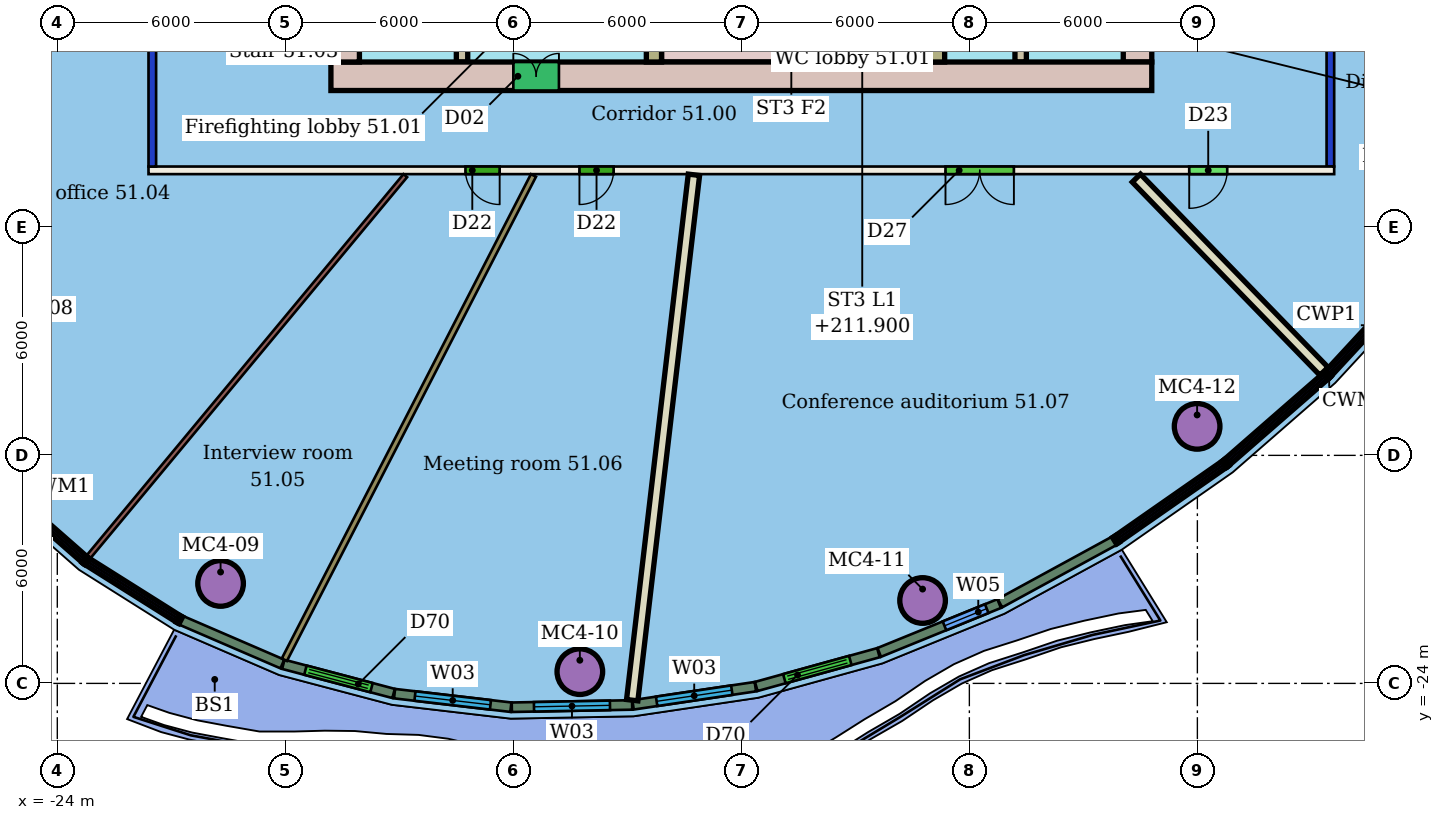
"""IFC4 building model, lengths in metres.
Left out: names, types, materials, properties, quantities, classifications, styles, units other than length and angle.
Written with IfcOpenShell. Run it as: python <this file> out.ifc"""

import sys

from ifc_helpers import new_model, si_unit, direction, frame, frame_2d, origin, origin_2d, place, context, subcontext, project, spatial, rectangle, hollow_circle, extrude, element, fill, save


model = new_model("IFC4")
c1 = context("Model", 3, precision=1e-05, world=origin(), true_north=direction((0.0, 1.0)))
c2 = subcontext(c1, "Body", "Model", "MODEL_VIEW")
j1 = project(units=[si_unit("LENGTHUNIT", "METRE"), si_unit("PLANEANGLEUNIT", "RADIAN")], contexts=[c1])
p1 = place(None, origin())
s1 = spatial("IfcSite", under=j1, at=p1, CompositionType="ELEMENT")
p2 = place(p1, origin())
s2 = spatial("IfcBuilding", under=s1, at=p2, CompositionType="ELEMENT")
p3 = place(p2, frame((0.0, 0.0, 210.1)))
s3 = spatial("IfcBuildingStorey", under=s2, at=p3, CompositionType="ELEMENT", Elevation=210.1)
for number, where, z_axis, x_axis in (
    (1, (-19.704, -21.37, 0.0), (0.0, 0.0, 1.0), (1.0, 0.0, 0.0)),
    (2, (-10.25, -23.691, 0.0), (0.0, 0.0, 1.0), (1.0, 0.0, 0.0)),
    (3, (-1.231, -21.819, 0.0), (0.0, 0.0, 1.0), (1.0, 0.0, 0.0)),
    (4, (5.993, -17.237, 0.0), (0.0, 0.0, 1.0), (1.0, 0.0, 0.0)),
):
    element("IfcColumn", number, at=place(p3, frame(where, z_axis=z_axis, x_axis=x_axis)), inside=s3, PredefinedType="COLUMN", context=c2, shape_type="SweptSolid", body=[
        extrude(hollow_circle(Radius=0.6, WallThickness=0.045, at=origin_2d()), origin(), (0.0, 0.0, 1.0), 3.45),
    ])
p4 = place(p3, frame((9.6, -10.5, 0.0), z_axis=(0.0, 0.0, 1.0), x_axis=(-1.0, 0.0, 0.0)))
e5 = element("IfcWall", 5, at=p4, inside=s3, PredefinedType="PARTITIONING", context=c2, shape_type="SweptSolid", body=[
    extrude(rectangle(XDim=31.2, YDim=0.2, at=frame_2d((15.6, 0.0))), origin(), (0.0, 0.0, 1.0), 3.45),
])
p5 = place(p4, frame((21.96, 0.0, 0.0)))
e6 = element("IfcOpeningElement", 6, at=p5, cuts=e5, PredefinedType="OPENING", context=c2, shape_type="SweptSolid", body=[
    extrude(rectangle(XDim=0.9, YDim=2.1, at=frame_2d((0.45, 1.05))), frame((0.0, 0.11, 0.0), z_axis=(0.0, -1.0, 0.0), x_axis=(1.0, 0.0, 0.0)), (0.0, 0.0, 1.0), 0.22),
])
p6 = place(p4, frame((18.96, 0.0, 0.0)))
e7 = element("IfcOpeningElement", 7, at=p6, cuts=e5, PredefinedType="OPENING", context=c2, shape_type="SweptSolid", body=[
    extrude(rectangle(XDim=0.9, YDim=2.1, at=frame_2d((0.45, 1.05))), frame((0.0, 0.11, 0.0), z_axis=(0.0, -1.0, 0.0), x_axis=(1.0, 0.0, 0.0)), (0.0, 0.0, 1.0), 0.22),
])
p7 = place(p4, frame((8.428, 0.0, 0.0)))
e8 = element("IfcOpeningElement", 8, at=p7, cuts=e5, PredefinedType="OPENING", context=c2, shape_type="SweptSolid", body=[
    extrude(rectangle(XDim=1.8, YDim=2.4, at=frame_2d((0.9, 1.2))), frame((0.0, 0.11, 0.0), z_axis=(0.0, -1.0, 0.0), x_axis=(1.0, 0.0, 0.0)), (0.0, 0.0, 1.0), 0.22),
])
p8 = place(p4, frame((2.814, 0.0, 0.0)))
e9 = element("IfcOpeningElement", 9, at=p8, cuts=e5, PredefinedType="OPENING", context=c2, shape_type="SweptSolid", body=[
    extrude(rectangle(XDim=1.0, YDim=2.4, at=frame_2d((0.5, 1.2))), frame((0.0, 0.11, 0.0), z_axis=(0.0, -1.0, 0.0), x_axis=(1.0, 0.0, 0.0)), (0.0, 0.0, 1.0), 0.22),
])
p9 = place(p3, frame((-21.5, -10.4, 0.0), z_axis=(0.0, 0.0, 1.0), x_axis=(0.0, 1.0, 0.0)))
e10 = element("IfcWall", 10, at=p9, inside=s3, PredefinedType="PARTITIONING", context=c2, shape_type="SweptSolid", body=[
    extrude(rectangle(XDim=20.8, YDim=0.2, at=frame_2d((10.4, 0.0))), origin(), (0.0, 0.0, 1.0), 3.05),
])
p10 = place(p9, frame((6.277, 0.0, 0.0)))
e11 = element("IfcOpeningElement", 11, at=p10, cuts=e10, PredefinedType="OPENING", context=c2, shape_type="SweptSolid", body=[
    extrude(rectangle(XDim=1.8, YDim=2.1, at=frame_2d((0.9, 1.05))), frame((0.0, 0.11, 0.0), z_axis=(0.0, -1.0, 0.0), x_axis=(1.0, 0.0, 0.0)), (0.0, 0.0, 1.0), 0.22),
])
p11 = place(p3, frame((9.5, 10.4, 0.0), z_axis=(0.0, 0.0, 1.0), x_axis=(0.0, -1.0, 0.0)))
e12 = element("IfcWall", 12, at=p11, inside=s3, PredefinedType="PARTITIONING", context=c2, shape_type="SweptSolid", body=[
    extrude(rectangle(XDim=20.8, YDim=0.2, at=frame_2d((10.4, 0.0))), origin(), (0.0, 0.0, 1.0), 3.05),
])
p12 = place(p11, frame((11.307, 0.0, 0.0)))
e13 = element("IfcOpeningElement", 13, at=p12, cuts=e12, PredefinedType="OPENING", context=c2, shape_type="SweptSolid", body=[
    extrude(rectangle(XDim=1.5, YDim=2.1, at=frame_2d((0.75, 1.05))), frame((0.0, 0.11, 0.0), z_axis=(0.0, -1.0, 0.0), x_axis=(1.0, 0.0, 0.0)), (0.0, 0.0, 1.0), 0.22),
])
p13 = place(p3, frame((-23.177, -20.668, 0.0), z_axis=(0.0, 0.0, 1.0), x_axis=(0.639167269964, 0.769067747995, 0.0)))
e14 = element("IfcWall", 14, at=p13, inside=s3, PredefinedType="PARTITIONING", context=c2, shape_type="SweptSolid", body=[
    extrude(rectangle(XDim=13.04, YDim=0.125, at=frame_2d((6.52, 0.0))), origin(), (0.0, 0.0, 1.0), 3.45),
])
p14 = place(p3, frame((-18.025, -23.377, 0.0), z_axis=(0.0, 0.0, 1.0), x_axis=(0.457440787156, 0.88924008358, 0.0)))
e15 = element("IfcWall", 15, at=p14, inside=s3, PredefinedType="PARTITIONING", context=c2, shape_type="SweptSolid", body=[
    extrude(rectangle(XDim=14.33, YDim=0.15, at=frame_2d((7.165, 0.0))), origin(), (0.0, 0.0, 1.0), 3.45),
])
p15 = place(p3, frame((-8.872, -24.442, 0.0), z_axis=(0.0, 0.0, 1.0), x_axis=(0.116708950742, 0.993166159722, 0.0)))
e16 = element("IfcWall", 16, at=p15, inside=s3, PredefinedType="PARTITIONING", context=c2, shape_type="SweptSolid", body=[
    extrude(rectangle(XDim=13.919, YDim=0.3, at=frame_2d((6.96, 0.0))), origin(), (0.0, 0.0, 1.0), 3.45),
])
p16 = place(p3, frame((9.332, -15.788, 0.0), z_axis=(0.0, 0.0, 1.0), x_axis=(-0.696678313938, 0.717383667843, 0.0)))
e17 = element("IfcWall", 17, at=p16, inside=s3, PredefinedType="PARTITIONING", context=c2, shape_type="SweptSolid", body=[
    extrude(rectangle(XDim=7.086, YDim=0.3, at=frame_2d((3.543, 0.0))), origin(), (0.0, 0.0, 1.0), 3.45),
])
p17 = place(p3, frame((15.576, -7.376, 0.0), z_axis=(0.0, 0.0, 1.0), x_axis=(-0.946227116855, 0.323503080863, 0.0)))
e18 = element("IfcWall", 18, at=p17, inside=s3, PredefinedType="PARTITIONING", context=c2, shape_type="SweptSolid", body=[
    extrude(rectangle(XDim=6.294, YDim=0.125, at=frame_2d((3.147, 0.0))), origin(), (0.0, 0.0, 1.0), 3.45),
])
p18 = place(p3, frame((-20.735, -22.343, 0.0), z_axis=(0.0, 0.0, 1.0), x_axis=(0.918186540839, -0.396148300794, 0.0)))
e19 = element("IfcWall", 19, at=p18, inside=s3, PredefinedType="SOLIDWALL", context=c2, shape_type="SweptSolid", body=[
    extrude(rectangle(XDim=2.894, YDim=0.25, at=frame_2d((1.447, 0.0))), origin(), (0.0, 0.0, 1.0), 3.1),
])
p19 = place(p3, frame((-18.053, -23.498, 0.0), z_axis=(0.0, 0.0, 1.0), x_axis=(0.966837064295, -0.255393991914, 0.0)))
e20 = element("IfcWall", 20, at=p19, inside=s3, PredefinedType="SOLIDWALL", context=c2, shape_type="SweptSolid", body=[
    extrude(rectangle(XDim=3.002, YDim=0.25, at=frame_2d((1.501, 0.0))), origin(), (0.0, 0.0, 1.0), 3.1),
])
p20 = place(p19, frame((0.601, 0.0, 0.0)))
e21 = element("IfcOpeningElement", 21, at=p20, cuts=e20, PredefinedType="OPENING", context=c2, shape_type="SweptSolid", body=[
    extrude(rectangle(XDim=1.8, YDim=2.4, at=frame_2d((0.9, 1.2))), frame((0.0, 0.135, 0.0), z_axis=(0.0, -1.0, 0.0), x_axis=(1.0, 0.0, 0.0)), (0.0, 0.0, 1.0), 0.27),
])
p21 = place(p3, frame((-15.125, -24.27, 0.0), z_axis=(0.0, 0.0, 1.0), x_axis=(0.993285162652, -0.115691770042, 0.0)))
e22 = element("IfcWall", 22, at=p21, inside=s3, PredefinedType="SOLIDWALL", context=c2, shape_type="SweptSolid", body=[
    extrude(rectangle(XDim=3.081, YDim=0.25, at=frame_2d((1.541, 0.0))), origin(), (0.0, 0.0, 1.0), 3.1),
])
p22 = place(p21, frame((0.541, 0.0, 0.9)))
e23 = element("IfcOpeningElement", 23, at=p22, cuts=e22, PredefinedType="OPENING", context=c2, shape_type="SweptSolid", body=[
    extrude(rectangle(XDim=2.0, YDim=2.1, at=frame_2d((1.0, 1.05))), frame((0.0, 0.135, 0.0), z_axis=(0.0, -1.0, 0.0), x_axis=(1.0, 0.0, 0.0)), (0.0, 0.0, 1.0), 0.27),
])
p23 = place(p3, frame((-12.04, -24.627, 0.0), z_axis=(0.0, 0.0, 1.0), x_axis=(0.999814312732, 0.019270185659, 0.0)))
e24 = element("IfcWall", 24, at=p23, inside=s3, PredefinedType="SOLIDWALL", context=c2, shape_type="SweptSolid", body=[
    extrude(rectangle(XDim=3.167, YDim=0.25, at=frame_2d((1.583, 0.0))), origin(), (0.0, 0.0, 1.0), 3.1),
])
p24 = place(p23, frame((0.584, 0.0, 0.9)))
e25 = element("IfcOpeningElement", 25, at=p24, cuts=e24, PredefinedType="OPENING", context=c2, shape_type="SweptSolid", body=[
    extrude(rectangle(XDim=2.0, YDim=2.1, at=frame_2d((1.0, 1.05))), frame((0.0, 0.135, 0.0), z_axis=(0.0, -1.0, 0.0), x_axis=(1.0, 0.0, 0.0)), (0.0, 0.0, 1.0), 0.27),
])
p25 = place(p3, frame((-8.85, -24.564, 0.0), z_axis=(0.0, 0.0, 1.0), x_axis=(0.989129217208, 0.147048943092, 0.0)))
e26 = element("IfcWall", 26, at=p25, inside=s3, PredefinedType="SOLIDWALL", context=c2, shape_type="SweptSolid", body=[
    extrude(rectangle(XDim=3.254, YDim=0.25, at=frame_2d((1.627, 0.0))), origin(), (0.0, 0.0, 1.0), 3.1),
])
p26 = place(p25, frame((0.627, 0.0, 0.9)))
e27 = element("IfcOpeningElement", 27, at=p26, cuts=e26, PredefinedType="OPENING", context=c2, shape_type="SweptSolid", body=[
    extrude(rectangle(XDim=2.0, YDim=2.1, at=frame_2d((1.0, 1.05))), frame((0.0, 0.135, 0.0), z_axis=(0.0, -1.0, 0.0), x_axis=(1.0, 0.0, 0.0)), (0.0, 0.0, 1.0), 0.27),
])
p27 = place(p3, frame((-5.608, -24.081, 0.0), z_axis=(0.0, 0.0, 1.0), x_axis=(0.963820322112, 0.266552784048, 0.0)))
e28 = element("IfcWall", 28, at=p27, inside=s3, PredefinedType="SOLIDWALL", context=c2, shape_type="SweptSolid", body=[
    extrude(rectangle(XDim=3.336, YDim=0.25, at=frame_2d((1.668, 0.0))), origin(), (0.0, 0.0, 1.0), 3.1),
])
p28 = place(p27, frame((0.768, 0.0, 0.0)))
e29 = element("IfcOpeningElement", 29, at=p28, cuts=e28, PredefinedType="OPENING", context=c2, shape_type="SweptSolid", body=[
    extrude(rectangle(XDim=1.8, YDim=2.4, at=frame_2d((0.9, 1.2))), frame((0.0, 0.135, 0.0), z_axis=(0.0, -1.0, 0.0), x_axis=(1.0, 0.0, 0.0)), (0.0, 0.0, 1.0), 0.27),
])
p29 = place(p3, frame((-2.372, -23.185, 0.0), z_axis=(0.0, 0.0, 1.0), x_axis=(0.926160966141, 0.377128446019, 0.0)))
e30 = element("IfcWall", 30, at=p29, inside=s3, PredefinedType="SOLIDWALL", context=c2, shape_type="SweptSolid", body=[
    extrude(rectangle(XDim=3.407, YDim=0.25, at=frame_2d((1.704, 0.0))), origin(), (0.0, 0.0, 1.0), 3.1),
])
p30 = place(p29, frame((1.854, 0.0, 0.9)))
e31 = element("IfcOpeningElement", 31, at=p30, cuts=e30, PredefinedType="OPENING", context=c2, shape_type="SweptSolid", body=[
    extrude(rectangle(XDim=1.2, YDim=2.1, at=frame_2d((0.6, 1.05))), frame((0.0, 0.135, 0.0), z_axis=(0.0, -1.0, 0.0), x_axis=(1.0, 0.0, 0.0)), (0.0, 0.0, 1.0), 0.27),
])
p31 = place(p3, frame((0.804, -21.89, 0.0), z_axis=(0.0, 0.0, 1.0), x_axis=(0.877865563138, 0.478907144503, 0.0)))
e32 = element("IfcWall", 32, at=p31, inside=s3, PredefinedType="SOLIDWALL", context=c2, shape_type="SweptSolid", body=[
    extrude(rectangle(XDim=3.42, YDim=0.25, at=frame_2d((1.71, 0.0))), origin(), (0.0, 0.0, 1.0), 3.1),
])
p32 = place(p3, frame((-16.8, -8.025, 0.0), z_axis=(0.0, 0.0, 1.0), x_axis=(1.0, 0.0, 0.0)))
e33 = element("IfcWall", 33, at=p32, inside=s3, PredefinedType="SHEAR", context=c2, shape_type="SweptSolid", body=[
    extrude(rectangle(XDim=21.6, YDim=0.75, at=frame_2d((10.8, 0.0))), origin(), (0.0, 0.0, 1.0), 3.3),
])
p33 = place(p32, frame((4.8, 0.0, 0.0)))
e34 = element("IfcOpeningElement", 34, at=p33, cuts=e33, PredefinedType="OPENING", context=c2, shape_type="SweptSolid", body=[
    extrude(rectangle(XDim=1.2, YDim=2.1, at=frame_2d((0.6, 1.05))), frame((0.0, 0.385, 0.0), z_axis=(0.0, -1.0, 0.0), x_axis=(1.0, 0.0, 0.0)), (0.0, 0.0, 1.0), 0.77),
])
p34 = place(p3, frame((-16.425, 7.65, 0.0), z_axis=(0.0, 0.0, 1.0), x_axis=(0.0, -1.0, 0.0)))
e35 = element("IfcWall", 35, at=p34, inside=s3, PredefinedType="SHEAR", context=c2, shape_type="SweptSolid", body=[
    extrude(rectangle(XDim=15.3, YDim=0.75, at=frame_2d((7.65, 0.0))), origin(), (0.0, 0.0, 1.0), 3.3),
])
p35 = place(p34, frame((11.25, 0.0, 0.0)))
e36 = element("IfcOpeningElement", 36, at=p35, cuts=e35, PredefinedType="OPENING", context=c2, shape_type="SweptSolid", body=[
    extrude(rectangle(XDim=1.2, YDim=2.1, at=frame_2d((0.6, 1.05))), frame((0.0, 0.385, 0.0), z_axis=(0.0, -1.0, 0.0), x_axis=(1.0, 0.0, 0.0)), (0.0, 0.0, 1.0), 0.77),
])
p36 = place(p34, frame((2.85, 0.0, 0.0)))
e37 = element("IfcOpeningElement", 37, at=p36, cuts=e35, PredefinedType="OPENING", context=c2, shape_type="SweptSolid", body=[
    extrude(rectangle(XDim=1.2, YDim=2.1, at=frame_2d((0.6, 1.05))), frame((0.0, 0.385, 0.0), z_axis=(0.0, -1.0, 0.0), x_axis=(1.0, 0.0, 0.0)), (0.0, 0.0, 1.0), 0.77),
])
p37 = place(p3, frame((4.425, -7.65, 0.0), z_axis=(0.0, 0.0, 1.0), x_axis=(0.0, 1.0, 0.0)))
e38 = element("IfcWall", 38, at=p37, inside=s3, PredefinedType="SHEAR", context=c2, shape_type="SweptSolid", body=[
    extrude(rectangle(XDim=15.3, YDim=0.75, at=frame_2d((7.65, 0.0))), origin(), (0.0, 0.0, 1.0), 3.3),
])
p38 = place(p37, frame((2.85, 0.0, 0.0)))
e39 = element("IfcOpeningElement", 39, at=p38, cuts=e38, PredefinedType="OPENING", context=c2, shape_type="SweptSolid", body=[
    extrude(rectangle(XDim=1.2, YDim=2.1, at=frame_2d((0.6, 1.05))), frame((0.0, 0.385, 0.0), z_axis=(0.0, -1.0, 0.0), x_axis=(1.0, 0.0, 0.0)), (0.0, 0.0, 1.0), 0.77),
])
p39 = place(p37, frame((11.25, 0.0, 0.0)))
e40 = element("IfcOpeningElement", 40, at=p39, cuts=e38, PredefinedType="OPENING", context=c2, shape_type="SweptSolid", body=[
    extrude(rectangle(XDim=1.2, YDim=2.1, at=frame_2d((0.6, 1.05))), frame((0.0, 0.385, 0.0), z_axis=(0.0, -1.0, 0.0), x_axis=(1.0, 0.0, 0.0)), (0.0, 0.0, 1.0), 0.77),
])
p40 = place(p3, frame((-13.35, 7.65, 0.0), z_axis=(0.0, 0.0, 1.0), x_axis=(0.0, -1.0, 0.0)))
e41 = element("IfcWall", 41, at=p40, inside=s3, PredefinedType="SHEAR", context=c2, shape_type="SweptSolid", body=[
    extrude(rectangle(XDim=15.3, YDim=0.3, at=frame_2d((7.65, 0.0))), origin(), (0.0, 0.0, 1.0), 3.3),
])
p41 = place(p40, frame((6.9, 0.0, 0.0)))
e42 = element("IfcOpeningElement", 42, at=p41, cuts=e41, PredefinedType="OPENING", context=c2, shape_type="SweptSolid", body=[
    extrude(rectangle(XDim=1.5, YDim=2.1, at=frame_2d((0.75, 1.05))), frame((0.0, 0.16, 0.0), z_axis=(0.0, -1.0, 0.0), x_axis=(1.0, 0.0, 0.0)), (0.0, 0.0, 1.0), 0.32),
])
p42 = place(p3, frame((1.35, -7.65, 0.0), z_axis=(0.0, 0.0, 1.0), x_axis=(0.0, 1.0, 0.0)))
e43 = element("IfcWall", 43, at=p42, inside=s3, PredefinedType="SHEAR", context=c2, shape_type="SweptSolid", body=[
    extrude(rectangle(XDim=15.3, YDim=0.3, at=frame_2d((7.65, 0.0))), origin(), (0.0, 0.0, 1.0), 3.3),
])
p43 = place(p42, frame((1.56, 0.0, 0.0)))
e44 = element("IfcOpeningElement", 44, at=p43, cuts=e43, PredefinedType="OPENING", context=c2, shape_type="SweptSolid", body=[
    extrude(rectangle(XDim=1.0, YDim=2.1, at=frame_2d((0.5, 1.05))), frame((0.0, 0.16, 0.0), z_axis=(0.0, -1.0, 0.0), x_axis=(1.0, 0.0, 0.0)), (0.0, 0.0, 1.0), 0.32),
])
p44 = place(p42, frame((6.9, 0.0, 0.0)))
e45 = element("IfcOpeningElement", 45, at=p44, cuts=e43, PredefinedType="OPENING", context=c2, shape_type="SweptSolid", body=[
    extrude(rectangle(XDim=1.5, YDim=2.1, at=frame_2d((0.75, 1.05))), frame((0.0, 0.16, 0.0), z_axis=(0.0, -1.0, 0.0), x_axis=(1.0, 0.0, 0.0)), (0.0, 0.0, 1.0), 0.32),
])
p45 = place(p3, frame((-8.3, -3.88, 0.0), z_axis=(0.0, 0.0, 1.0), x_axis=(0.0, -1.0, 0.0)))
e46 = element("IfcWall", 46, at=p45, inside=s3, PredefinedType="SHEAR", context=c2, shape_type="SweptSolid", body=[
    extrude(rectangle(XDim=3.77, YDim=0.4, at=frame_2d((1.885, 0.0))), origin(), (0.0, 0.0, 1.0), 3.3),
])
p46 = place(p45, frame((1.11, 0.0, 0.0)))
e47 = element("IfcOpeningElement", 47, at=p46, cuts=e46, PredefinedType="OPENING", context=c2, shape_type="SweptSolid", body=[
    extrude(rectangle(XDim=1.2, YDim=2.1, at=frame_2d((0.6, 1.05))), frame((0.0, 0.21, 0.0), z_axis=(0.0, -1.0, 0.0), x_axis=(1.0, 0.0, 0.0)), (0.0, 0.0, 1.0), 0.42),
])
p47 = place(p3, frame((-0.85, -3.88, 0.0), z_axis=(0.0, 0.0, 1.0), x_axis=(0.0, -1.0, 0.0)))
e48 = element("IfcWall", 48, at=p47, inside=s3, PredefinedType="SHEAR", context=c2, shape_type="SweptSolid", body=[
    extrude(rectangle(XDim=3.77, YDim=0.4, at=frame_2d((1.885, 0.0))), origin(), (0.0, 0.0, 1.0), 3.3),
])
p48 = place(p3, frame((-8.1, -7.475, 0.0), z_axis=(0.0, 0.0, 1.0), x_axis=(1.0, 0.0, 0.0)))
e49 = element("IfcWall", 49, at=p48, inside=s3, PredefinedType="SHEAR", context=c2, shape_type="SweptSolid", body=[
    extrude(rectangle(XDim=7.05, YDim=0.35, at=frame_2d((3.525, 0.0))), origin(), (0.0, 0.0, 1.0), 3.3),
])
p49 = place(p5, origin())
e50 = element("IfcDoor", 50, at=p49, inside=s3, OperationType="SINGLE_SWING_LEFT", PredefinedType="DOOR", context=c2, shape_type="SweptSolid", body=[
    extrude(rectangle(XDim=0.9, YDim=2.1, at=frame_2d((0.45, 1.05))), frame((0.0, 0.025, 0.0), z_axis=(0.0, -1.0, 0.0), x_axis=(1.0, 0.0, 0.0)), (0.0, 0.0, 1.0), 0.05),
])
fill(e6, e50)
p50 = place(p6, origin())
e51 = element("IfcDoor", 51, at=p50, inside=s3, OperationType="SINGLE_SWING_RIGHT", PredefinedType="DOOR", context=c2, shape_type="SweptSolid", body=[
    extrude(rectangle(XDim=0.9, YDim=2.1, at=frame_2d((0.45, 1.05))), frame((0.0, 0.025, 0.0), z_axis=(0.0, -1.0, 0.0), x_axis=(1.0, 0.0, 0.0)), (0.0, 0.0, 1.0), 0.05),
])
fill(e7, e51)
p51 = place(p7, origin())
e52 = element("IfcDoor", 52, at=p51, inside=s3, OperationType="DOUBLE_DOOR_SINGLE_SWING", PredefinedType="DOOR", context=c2, shape_type="SweptSolid", body=[
    extrude(rectangle(XDim=1.8, YDim=2.4, at=frame_2d((0.9, 1.2))), frame((0.0, 0.025, 0.0), z_axis=(0.0, -1.0, 0.0), x_axis=(1.0, 0.0, 0.0)), (0.0, 0.0, 1.0), 0.05),
])
fill(e8, e52)
p52 = place(p8, origin())
e53 = element("IfcDoor", 53, at=p52, inside=s3, OperationType="SINGLE_SWING_RIGHT", PredefinedType="DOOR", context=c2, shape_type="SweptSolid", body=[
    extrude(rectangle(XDim=1.0, YDim=2.4, at=frame_2d((0.5, 1.2))), frame((0.0, 0.025, 0.0), z_axis=(0.0, -1.0, 0.0), x_axis=(1.0, 0.0, 0.0)), (0.0, 0.0, 1.0), 0.05),
])
fill(e9, e53)
p53 = place(p20, origin())
e54 = element("IfcDoor", 54, at=p53, inside=s3, OperationType="DOUBLE_DOOR_SLIDING", PredefinedType="DOOR", context=c2, shape_type="SweptSolid", body=[
    extrude(rectangle(XDim=1.8, YDim=2.4, at=frame_2d((0.9, 1.2))), frame((0.0, 0.025, 0.0), z_axis=(0.0, -1.0, 0.0), x_axis=(1.0, 0.0, 0.0)), (0.0, 0.0, 1.0), 0.05),
])
fill(e21, e54)
p54 = place(p22, origin())
e55 = element("IfcWindow", 55, at=p54, inside=s3, PartitioningType="SINGLE_PANEL", PredefinedType="WINDOW", context=c2, shape_type="SweptSolid", body=[
    extrude(rectangle(XDim=2.0, YDim=2.1, at=frame_2d((1.0, 1.05))), frame((0.0, 0.03, 0.0), z_axis=(0.0, -1.0, 0.0), x_axis=(1.0, 0.0, 0.0)), (0.0, 0.0, 1.0), 0.06),
])
fill(e23, e55)
p55 = place(p24, origin())
e56 = element("IfcWindow", 56, at=p55, inside=s3, PartitioningType="SINGLE_PANEL", PredefinedType="WINDOW", context=c2, shape_type="SweptSolid", body=[
    extrude(rectangle(XDim=2.0, YDim=2.1, at=frame_2d((1.0, 1.05))), frame((0.0, 0.03, 0.0), z_axis=(0.0, -1.0, 0.0), x_axis=(1.0, 0.0, 0.0)), (0.0, 0.0, 1.0), 0.06),
])
fill(e25, e56)
p56 = place(p26, origin())
e57 = element("IfcWindow", 57, at=p56, inside=s3, PartitioningType="SINGLE_PANEL", PredefinedType="WINDOW", context=c2, shape_type="SweptSolid", body=[
    extrude(rectangle(XDim=2.0, YDim=2.1, at=frame_2d((1.0, 1.05))), frame((0.0, 0.03, 0.0), z_axis=(0.0, -1.0, 0.0), x_axis=(1.0, 0.0, 0.0)), (0.0, 0.0, 1.0), 0.06),
])
fill(e27, e57)
p57 = place(p28, origin())
e58 = element("IfcDoor", 58, at=p57, inside=s3, OperationType="DOUBLE_DOOR_SLIDING", PredefinedType="DOOR", context=c2, shape_type="SweptSolid", body=[
    extrude(rectangle(XDim=1.8, YDim=2.4, at=frame_2d((0.9, 1.2))), frame((0.0, 0.025, 0.0), z_axis=(0.0, -1.0, 0.0), x_axis=(1.0, 0.0, 0.0)), (0.0, 0.0, 1.0), 0.05),
])
fill(e29, e58)
p58 = place(p30, origin())
e59 = element("IfcWindow", 59, at=p58, inside=s3, PartitioningType="SINGLE_PANEL", PredefinedType="WINDOW", context=c2, shape_type="SweptSolid", body=[
    extrude(rectangle(XDim=1.2, YDim=2.1, at=frame_2d((0.6, 1.05))), frame((0.0, 0.03, 0.0), z_axis=(0.0, -1.0, 0.0), x_axis=(1.0, 0.0, 0.0)), (0.0, 0.0, 1.0), 0.06),
])
fill(e31, e59)
p59 = place(p33, origin())
e60 = element("IfcDoor", 60, at=p59, inside=s3, OperationType="DOUBLE_DOOR_SINGLE_SWING", PredefinedType="NOTDEFINED", context=c2, shape_type="SweptSolid", body=[
    extrude(rectangle(XDim=1.2, YDim=2.1, at=frame_2d((0.6, 1.05))), frame((0.0, 0.025, 0.0), z_axis=(0.0, -1.0, 0.0), x_axis=(1.0, 0.0, 0.0)), (0.0, 0.0, 1.0), 0.05),
])
fill(e34, e60)
save(model, sys.argv[1])
